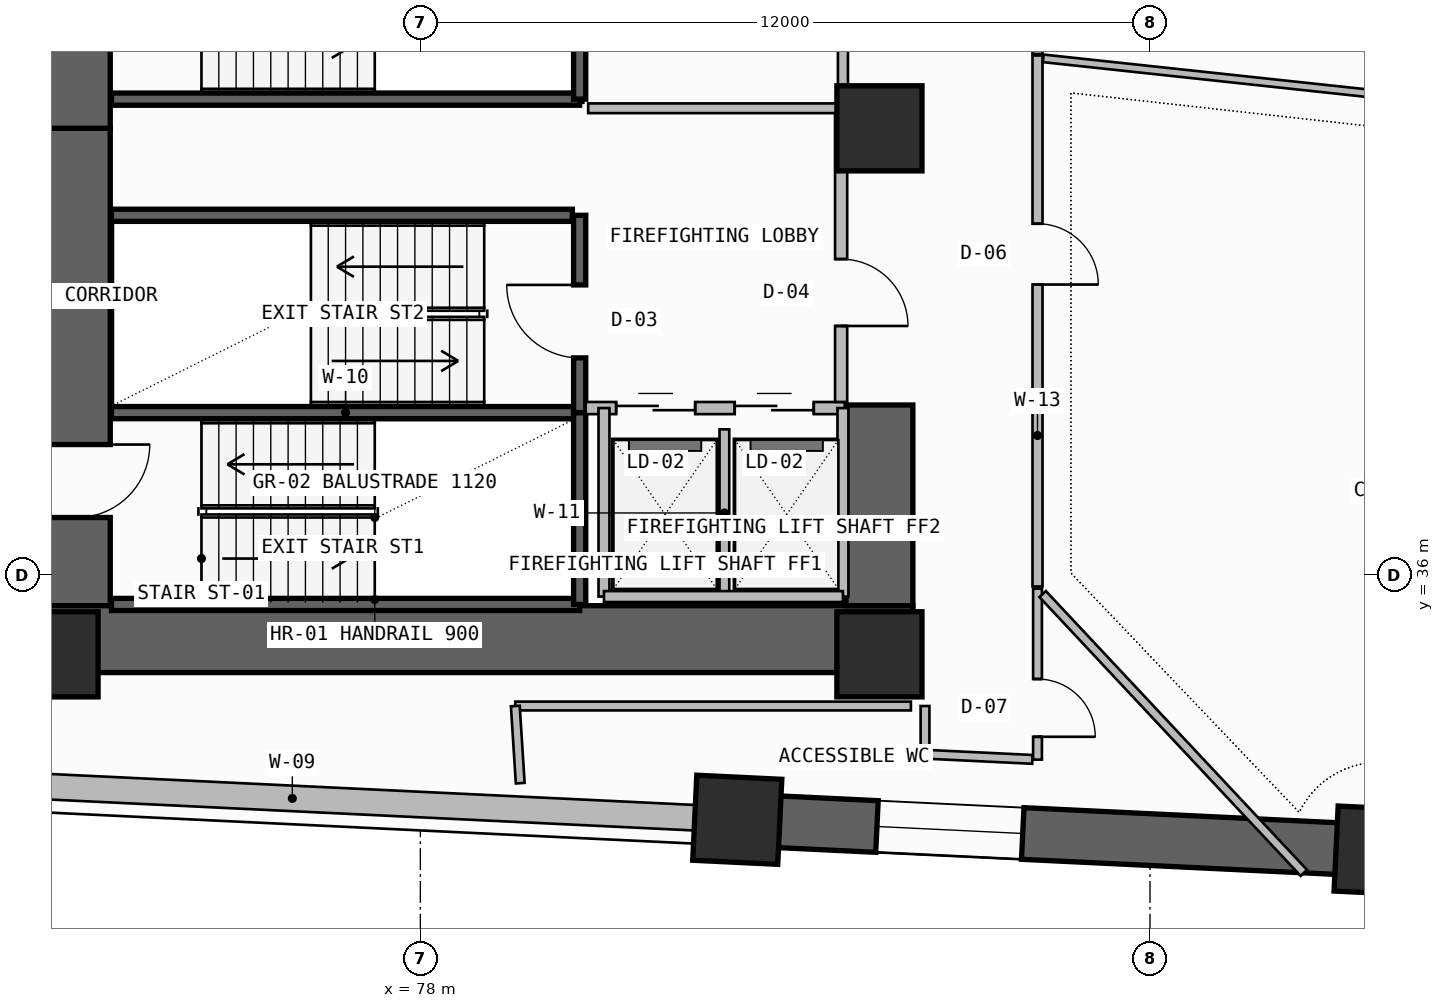
"""IFC4 building model, lengths in metres.
Left out: names, types, materials, properties, quantities, classifications, styles, units other than length and angle.
Written with IfcOpenShell. Run it as: python <this file> out.ifc"""

import sys

from ifc_helpers import new_model, si_unit, direction, frame, frame_2d, origin, origin_2d, place, context, subcontext, project, spatial, rectangle, extrude, element, fill, save


model = new_model("IFC4")
c1 = context("Model", 3, precision=1e-05, world=origin(), true_north=direction((0.0, 1.0)))
c2 = subcontext(c1, "Body", "Model", "MODEL_VIEW")
j1 = project(units=[si_unit("LENGTHUNIT", "METRE"), si_unit("PLANEANGLEUNIT", "RADIAN")], contexts=[c1])
p1 = place(None, origin())
s1 = spatial("IfcSite", under=j1, at=p1, CompositionType="ELEMENT")
p2 = place(p1, origin())
s2 = spatial("IfcBuilding", under=s1, at=p2, CompositionType="ELEMENT")
p3 = place(p2, frame((0.0, 0.0, 48.3)))
s3 = spatial("IfcBuildingStorey", under=s2, at=p3, CompositionType="ELEMENT", Elevation=48.3)
p4 = place(p3, frame((72.35, 35.5, -0.26), z_axis=(0.0, 0.0, 1.0), x_axis=(0.0, 1.0, 0.0)))
e1 = element("IfcWall", 1, at=p4, inside=s3, PredefinedType="SHEAR", context=c2, shape_type="SweptSolid", body=[
    extrude(rectangle(XDim=7.85, YDim=1.1, at=frame_2d((3.925, 0.0))), origin(), (0.0, 0.0, 1.0), 3.66),
])
p5 = place(p4, frame((1.45, 0.0, 0.26)))
e2 = element("IfcOpeningElement", 2, at=p5, cuts=e1, PredefinedType="OPENING", context=c2, shape_type="SweptSolid", body=[
    extrude(rectangle(XDim=1.2, YDim=2.2, at=frame_2d((0.6, 1.1))), frame((0.0, 0.56, 0.0), z_axis=(0.0, -1.0, 0.0), x_axis=(1.0, 0.0, 0.0)), (0.0, 0.0, 1.0), 1.12),
])
p6 = place(p3, frame((71.8, 34.95, -0.26), z_axis=(0.0, 0.0, 1.0), x_axis=(1.0, 0.0, 0.0)))
e3 = element("IfcWall", 3, at=p6, inside=s3, PredefinedType="SHEAR", context=c2, shape_type="SweptSolid", body=[
    extrude(rectangle(XDim=14.3, YDim=1.1, at=frame_2d((7.15, 0.0))), origin(), (0.0, 0.0, 1.0), 3.66),
])
p7 = place(p3, frame((85.55, 35.5, -0.26), z_axis=(0.0, 0.0, 1.0), x_axis=(0.0, 1.0, 0.0)))
e4 = element("IfcWall", 4, at=p7, inside=s3, PredefinedType="SHEAR", context=c2, shape_type="SweptSolid", body=[
    extrude(rectangle(XDim=3.3, YDim=1.1, at=frame_2d((1.65, 0.0))), origin(), (0.0, 0.0, 1.0), 3.66),
])
p8 = place(p3, frame((72.35, 43.35, -0.26), z_axis=(0.0, 0.0, 1.0), x_axis=(0.0, 1.0, 0.0)))
e5 = element("IfcWall", 5, at=p8, inside=s3, PredefinedType="SHEAR", context=c2, shape_type="SweptSolid", body=[
    extrude(rectangle(XDim=12.7, YDim=1.1, at=frame_2d((6.35, 0.0))), origin(), (0.0, 0.0, 1.0), 3.66),
])
p9 = place(p8, frame((1.35, 0.0, 0.26)))
e6 = element("IfcOpeningElement", 6, at=p9, cuts=e5, PredefinedType="OPENING", context=c2, shape_type="SweptSolid", body=[
    extrude(rectangle(XDim=1.2, YDim=2.2, at=frame_2d((0.6, 1.1))), frame((0.0, 0.56, 0.0), z_axis=(0.0, -1.0, 0.0), x_axis=(1.0, 0.0, 0.0)), (0.0, 0.0, 1.0), 1.12),
])
for number, where, z_axis, x_axis in (
    (7, (72.0, 34.7, 0.0), (0.0, 0.0, 1.0), (1.0, 0.0, 0.0)),
    (8, (85.55, 34.7, 0.0), (0.0, 0.0, 1.0), (1.0, 0.0, 0.0)),
    (9, (85.55, 43.35, 0.0), (0.0, 0.0, 1.0), (1.0, 0.0, 0.0)),
    (10, (83.212, 31.979, 0.0), (0.0, 0.0, 1.0), (-0.999, 0.048, 0.0)),
    (11, (93.76, 31.472, 0.0), (0.0, 0.0, 1.0), (-0.999, 0.048, 0.0)),
):
    element("IfcColumn", number, at=place(p3, frame(where, z_axis=z_axis, x_axis=x_axis)), inside=s3, PredefinedType="COLUMN", context=c2, shape_type="SweptSolid", body=[
        extrude(rectangle(XDim=1.4, YDim=1.4, at=origin_2d()), origin(), (0.0, 0.0, 1.0), 3.6),
    ])
p10 = place(p3, frame((65.281, 32.841, 0.0), z_axis=(0.0, 0.0, 1.0), x_axis=(0.998848298084, -0.047979968897, 0.0)))
e12 = element("IfcWall", 12, at=p10, inside=s3, PredefinedType="SOLIDWALL", context=c2, shape_type="SweptSolid", body=[
    extrude(rectangle(XDim=17.952, YDim=0.42, at=frame_2d((8.976, 0.0))), origin(), (0.0, 0.0, 1.0), 2.385),
])
p11 = place(p10, frame((0.9, 0.0, 1.2)))
e13 = element("IfcOpeningElement", 13, at=p11, cuts=e12, PredefinedType="OPENING", context=c2, shape_type="SweptSolid", body=[
    extrude(rectangle(XDim=2.4, YDim=0.9, at=frame_2d((1.2, 0.45))), frame((0.0, 0.22, 0.0), z_axis=(0.0, -1.0, 0.0), x_axis=(1.0, 0.0, 0.0)), (0.0, 0.0, 1.0), 0.44),
])
p12 = place(p3, frame((83.212, 31.979, -0.26), z_axis=(0.0, 0.0, 1.0), x_axis=(0.998848235141, -0.047981279227, 0.0)))
e14 = element("IfcWall", 14, at=p12, inside=s3, PredefinedType="SHEAR", context=c2, shape_type="SweptSolid", body=[
    extrude(rectangle(XDim=27.456, YDim=0.85, at=frame_2d((13.728, 0.0))), origin(), (0.0, 0.0, 1.0), 3.66),
])
p13 = place(p12, frame((2.3, 0.0, 1.2)))
e15 = element("IfcOpeningElement", 15, at=p13, cuts=e14, PredefinedType="OPENING", context=c2, shape_type="SweptSolid", body=[
    extrude(rectangle(XDim=2.4, YDim=0.9, at=frame_2d((1.2, 0.45))), frame((0.0, 0.435, 0.0), z_axis=(0.0, -1.0, 0.0), x_axis=(1.0, 0.0, 0.0)), (0.0, 0.0, 1.0), 0.87),
])
for number, where, z_axis, x_axis in (
    (16, (72.92, 35.52, -0.26), (0.0, 0.0, 1.0), (1.0, 0.0, 0.0)),
    (17, (72.92, 38.675, -0.26), (0.0, 0.0, 1.0), (1.0, 0.0, 0.0)),
):
    element("IfcWall", number, at=place(p3, frame(where, z_axis=z_axis, x_axis=x_axis)), inside=s3, PredefinedType="SOLIDWALL", context=c2, shape_type="SweptSolid", body=[
        extrude(rectangle(XDim=7.7, YDim=0.2, at=frame_2d((3.85, 0.0))), origin(), (0.0, 0.0, 1.0), 3.66),
    ])
p14 = place(p3, frame((80.62, 35.52, -0.26), z_axis=(0.0, 0.0, 1.0), x_axis=(0.0, 1.0, 0.0)))
e18 = element("IfcWall", 18, at=p14, inside=s3, PredefinedType="SOLIDWALL", context=c2, shape_type="SweptSolid", body=[
    extrude(rectangle(XDim=3.155, YDim=0.2, at=frame_2d((1.578, 0.0))), origin(), (0.0, 0.0, 1.0), 3.66),
])
p15 = place(p3, frame((80.62, 38.675, -0.26), z_axis=(0.0, 0.0, 1.0), x_axis=(0.0, 1.0, 0.0)))
e19 = element("IfcWall", 19, at=p15, inside=s3, PredefinedType="SOLIDWALL", context=c2, shape_type="SweptSolid", body=[
    extrude(rectangle(XDim=3.245, YDim=0.2, at=frame_2d((1.623, 0.0))), origin(), (0.0, 0.0, 1.0), 3.66),
])
p16 = place(p15, frame((0.9, 0.0, 0.26)))
e20 = element("IfcOpeningElement", 20, at=p16, cuts=e19, PredefinedType="OPENING", context=c2, shape_type="SweptSolid", body=[
    extrude(rectangle(XDim=1.2, YDim=2.2, at=frame_2d((0.6, 1.1))), frame((0.0, 0.11, 0.0), z_axis=(0.0, -1.0, 0.0), x_axis=(1.0, 0.0, 0.0)), (0.0, 0.0, 1.0), 0.22),
])
p17 = place(p3, frame((80.72, 38.75, 0.0), z_axis=(0.0, 0.0, 1.0), x_axis=(1.0, 0.0, 0.0)))
e21 = element("IfcWall", 21, at=p17, inside=s3, PredefinedType="SOLIDWALL", context=c2, shape_type="SweptSolid", body=[
    extrude(rectangle(XDim=4.26, YDim=0.2, at=frame_2d((2.13, 0.0))), origin(), (0.0, 0.0, 1.0), 3.4),
])
p18 = place(p17, frame((0.5, 0.0, 0.0)))
e22 = element("IfcOpeningElement", 22, at=p18, cuts=e21, PredefinedType="OPENING", context=c2, shape_type="SweptSolid", body=[
    extrude(rectangle(XDim=1.3, YDim=2.3, at=frame_2d((0.65, 1.15))), frame((0.0, 0.11, 0.0), z_axis=(0.0, -1.0, 0.0), x_axis=(1.0, 0.0, 0.0)), (0.0, 0.0, 1.0), 0.22),
])
p19 = place(p17, frame((2.45, 0.0, 0.0)))
e23 = element("IfcOpeningElement", 23, at=p19, cuts=e21, PredefinedType="OPENING", context=c2, shape_type="SweptSolid", body=[
    extrude(rectangle(XDim=1.3, YDim=2.3, at=frame_2d((0.65, 1.15))), frame((0.0, 0.11, 0.0), z_axis=(0.0, -1.0, 0.0), x_axis=(1.0, 0.0, 0.0)), (0.0, 0.0, 1.0), 0.22),
])
p20 = place(p3, frame((83.0, 35.65, 0.0), z_axis=(0.0, 0.0, 1.0), x_axis=(0.0, 1.0, 0.0)))
e24 = element("IfcWall", 24, at=p20, inside=s3, PredefinedType="PLUMBINGWALL", context=c2, shape_type="SweptSolid", body=[
    extrude(rectangle(XDim=2.75, YDim=0.16, at=frame_2d((1.375, 0.0))), origin(), (0.0, 0.0, 1.0), 3.4),
])
for number, where, z_axis, x_axis in (
    (25, (84.95, 35.65, 0.0), (0.0, 0.0, 1.0), (0.0, 1.0, 0.0)),
    (26, (81.02, 35.65, 0.0), (0.0, 0.0, 1.0), (0.0, 1.0, 0.0)),
):
    element("IfcWall", number, at=place(p3, frame(where, z_axis=z_axis, x_axis=x_axis)), inside=s3, PredefinedType="SOLIDWALL", context=c2, shape_type="SweptSolid", body=[
        extrude(rectangle(XDim=3.1, YDim=0.18, at=frame_2d((1.55, 0.0))), origin(), (0.0, 0.0, 1.0), 3.4),
    ])
p21 = place(p3, frame((81.02, 35.65, 0.0), z_axis=(0.0, 0.0, 1.0), x_axis=(1.0, 0.0, 0.0)))
e27 = element("IfcWall", 27, at=p21, inside=s3, PredefinedType="SOLIDWALL", context=c2, shape_type="SweptSolid", body=[
    extrude(rectangle(XDim=3.93, YDim=0.18, at=frame_2d((1.965, 0.0))), origin(), (0.0, 0.0, 1.0), 3.4),
])
p22 = place(p3, frame((84.92, 38.85, 0.0), z_axis=(0.0, 0.0, 1.0), x_axis=(0.0, 1.0, 0.0)))
e28 = element("IfcWall", 28, at=p22, inside=s3, PredefinedType="SOLIDWALL", context=c2, shape_type="SweptSolid", body=[
    extrude(rectangle(XDim=4.83, YDim=0.2, at=frame_2d((2.415, 0.0))), origin(), (0.0, 0.0, 1.0), 3.4),
])
p23 = place(p22, frame((1.25, 0.0, 0.0)))
e29 = element("IfcOpeningElement", 29, at=p23, cuts=e28, PredefinedType="OPENING", context=c2, shape_type="SweptSolid", body=[
    extrude(rectangle(XDim=1.1, YDim=2.2, at=frame_2d((0.55, 1.1))), frame((0.0, 0.11, 0.0), z_axis=(0.0, -1.0, 0.0), x_axis=(1.0, 0.0, 0.0)), (0.0, 0.0, 1.0), 0.22),
])
p24 = place(p3, frame((72.92, 41.92, -0.26), z_axis=(0.0, 0.0, 1.0), x_axis=(1.0, 0.0, 0.0)))
e30 = element("IfcWall", 30, at=p24, inside=s3, PredefinedType="SOLIDWALL", context=c2, shape_type="SweptSolid", body=[
    extrude(rectangle(XDim=7.58, YDim=0.2, at=frame_2d((3.79, 0.0))), origin(), (0.0, 0.0, 1.0), 3.66),
])
p25 = place(p3, frame((72.92, 43.83, -0.26), z_axis=(0.0, 0.0, 1.0), x_axis=(1.0, 0.0, 0.0)))
e31 = element("IfcWall", 31, at=p25, inside=s3, PredefinedType="SOLIDWALL", context=c2, shape_type="SweptSolid", body=[
    extrude(rectangle(XDim=7.7, YDim=0.2, at=frame_2d((3.85, 0.0))), origin(), (0.0, 0.0, 1.0), 3.66),
])
p26 = place(p3, frame((80.62, 43.83, -0.26), z_axis=(0.0, 0.0, 1.0), x_axis=(0.0, 1.0, 0.0)))
e32 = element("IfcWall", 32, at=p26, inside=s3, PredefinedType="SOLIDWALL", context=c2, shape_type="SweptSolid", body=[
    extrude(rectangle(XDim=3.24, YDim=0.2, at=frame_2d((1.62, 0.0))), origin(), (0.0, 0.0, 1.0), 3.66),
])
p27 = place(p3, frame((84.95, 43.68, 0.0), z_axis=(0.0, 0.0, 1.0), x_axis=(0.0, 1.0, 0.0)))
e33 = element("IfcWall", 33, at=p27, inside=s3, PredefinedType="PLUMBINGWALL", context=c2, shape_type="SweptSolid", body=[
    extrude(rectangle(XDim=1.9, YDim=0.165, at=frame_2d((0.95, 0.0))), origin(), (0.0, 0.0, 1.0), 3.4),
])
p28 = place(p3, frame((80.76, 43.68, 0.0), z_axis=(0.0, 0.0, 1.0), x_axis=(1.0, 0.0, 0.0)))
e34 = element("IfcWall", 34, at=p28, inside=s3, PredefinedType="PLUMBINGWALL", context=c2, shape_type="SweptSolid", body=[
    extrude(rectangle(XDim=4.19, YDim=0.16, at=frame_2d((2.095, 0.0))), origin(), (0.0, 0.0, 1.0), 3.4),
])
p29 = place(p3, frame((88.15, 32.969, 0.0), z_axis=(0.0, 0.0, 1.0), x_axis=(0.0, 1.0, 0.0)))
e35 = element("IfcWall", 35, at=p29, inside=s3, PredefinedType="PARTITIONING", context=c2, shape_type="SweptSolid", body=[
    extrude(rectangle(XDim=2.813, YDim=0.145, at=frame_2d((1.406, 0.0))), origin(), (0.0, 0.0, 1.0), 2.785),
])
p30 = place(p29, frame((0.375, 0.0, 0.0)))
e36 = element("IfcOpeningElement", 36, at=p30, cuts=e35, PredefinedType="OPENING", context=c2, shape_type="SweptSolid", body=[
    extrude(rectangle(XDim=0.95, YDim=2.15, at=frame_2d((0.475, 1.075))), frame((0.0, 0.083, 0.0), z_axis=(0.0, -1.0, 0.0), x_axis=(1.0, 0.0, 0.0)), (0.0, 0.0, 1.0), 0.165),
])
p31 = place(p3, frame((86.3, 33.057, 0.0), z_axis=(0.0, 0.0, 1.0), x_axis=(0.998843945898, -0.048070487232, 0.0)))
e37 = element("IfcWall", 37, at=p31, inside=s3, PredefinedType="PARTITIONING", context=c2, shape_type="SweptSolid", body=[
    extrude(rectangle(XDim=1.767, YDim=0.145, at=frame_2d((0.884, 0.0))), origin(), (0.0, 0.0, 1.0), 3.4),
])
p32 = place(p3, frame((86.3, 33.85, 0.0), z_axis=(0.0, 0.0, 1.0), x_axis=(0.0, -1.0, 0.0)))
e38 = element("IfcWall", 38, at=p32, inside=s3, PredefinedType="PARTITIONING", context=c2, shape_type="SweptSolid", body=[
    extrude(rectangle(XDim=0.793, YDim=0.145, at=frame_2d((0.396, 0.0))), origin(), (0.0, 0.0, 1.0), 2.935),
])
p33 = place(p3, frame((88.235, 35.691, 0.0), z_axis=(0.0, 0.0, 1.0), x_axis=(0.683667039651, -0.729794066086, 0.0)))
e39 = element("IfcWall", 39, at=p33, inside=s3, PredefinedType="PARTITIONING", context=c2, shape_type="SweptSolid", body=[
    extrude(rectangle(XDim=6.282, YDim=0.145, at=frame_2d((3.141, 0.0))), origin(), (0.0, 0.0, 1.0), 2.385),
])
p34 = place(p3, frame((88.15, 35.816, 0.0), z_axis=(0.0, 0.0, 1.0), x_axis=(0.0, 1.0, 0.0)))
e40 = element("IfcWall", 40, at=p34, inside=s3, PredefinedType="PARTITIONING", context=c2, shape_type="SweptSolid", body=[
    extrude(rectangle(XDim=8.731, YDim=0.165, at=frame_2d((4.366, 0.0))), origin(), (0.0, 0.0, 1.0), 2.785),
])
p35 = place(p34, frame((4.965, 0.0, 0.0)))
e41 = element("IfcOpeningElement", 41, at=p35, cuts=e40, PredefinedType="OPENING", context=c2, shape_type="SweptSolid", body=[
    extrude(rectangle(XDim=1.0, YDim=2.2, at=frame_2d((0.5, 1.1))), frame((0.0, 0.093, 0.0), z_axis=(0.0, -1.0, 0.0), x_axis=(1.0, 0.0, 0.0)), (0.0, 0.0, 1.0), 0.185),
])
p36 = place(p3, frame((88.244, 44.501, 0.0), z_axis=(0.0, 0.0, 1.0), x_axis=(0.994268709567, -0.106909930207, 0.0)))
e42 = element("IfcWall", 42, at=p36, inside=s3, PredefinedType="PARTITIONING", context=c2, shape_type="SweptSolid", body=[
    extrude(rectangle(XDim=23.037, YDim=0.125, at=frame_2d((11.519, 0.0))), origin(), (0.0, 0.0, 1.0), 2.785),
])
p37 = place(p3, frame((88.15, 44.572, 0.0), z_axis=(0.0, 0.0, 1.0), x_axis=(0.0, 1.0, 0.0)))
e43 = element("IfcWall", 43, at=p37, inside=s3, PredefinedType="PARTITIONING", context=c2, shape_type="SweptSolid", body=[
    extrude(rectangle(XDim=7.238, YDim=0.165, at=frame_2d((3.619, 0.0))), origin(), (0.0, 0.0, 1.0), 2.785),
])
p38 = place(p37, frame((2.819, 0.0, 0.0)))
e44 = element("IfcOpeningElement", 44, at=p38, cuts=e43, PredefinedType="OPENING", context=c2, shape_type="SweptSolid", body=[
    extrude(rectangle(XDim=1.6, YDim=2.3, at=frame_2d((0.8, 1.15))), frame((0.0, 0.093, 0.0), z_axis=(0.0, -1.0, 0.0), x_axis=(1.0, 0.0, 0.0)), (0.0, 0.0, 1.0), 0.185),
])
p39 = place(p3, frame((79.562, 33.85, 0.0), z_axis=(0.0, 0.0, 1.0), x_axis=(1.0, 0.0, 0.0)))
e45 = element("IfcWall", 45, at=p39, inside=s3, PredefinedType="PARTITIONING", context=c2, shape_type="SweptSolid", body=[
    extrude(rectangle(XDim=6.506, YDim=0.145, at=frame_2d((3.253, 0.0))), origin(), (0.0, 0.0, 1.0), 2.785),
])
p40 = place(p3, frame((79.643, 32.581, 0.0), z_axis=(0.0, 0.0, 1.0), x_axis=(-0.06375305254, 0.997965704968, 0.0)))
e46 = element("IfcWall", 46, at=p40, inside=s3, PredefinedType="PARTITIONING", context=c2, shape_type="SweptSolid", body=[
    extrude(rectangle(XDim=1.271, YDim=0.145, at=frame_2d((0.636, 0.0))), origin(), (0.0, 0.0, 1.0), 3.4),
])
p41 = place(p13, origin())
e47 = element("IfcWindow", 47, at=p41, inside=s3, PartitioningType="SINGLE_PANEL", PredefinedType="WINDOW", context=c2, shape_type="SweptSolid", body=[
    extrude(rectangle(XDim=2.4, YDim=0.9, at=frame_2d((1.2, 0.45))), frame((0.0, 0.03, 0.0), z_axis=(0.0, -1.0, 0.0), x_axis=(1.0, 0.0, 0.0)), (0.0, 0.0, 1.0), 0.06),
])
fill(e15, e47)
p42 = place(p5, frame((1.2, 0.0, 0.0), z_axis=(0.0, 0.0, 1.0), x_axis=(-1.0, 0.0, 0.0)))
e48 = element("IfcDoor", 48, at=p42, inside=s3, OperationType="SINGLE_SWING_LEFT", PredefinedType="USERDEFINED", context=c2, shape_type="SweptSolid", body=[
    extrude(rectangle(XDim=1.2, YDim=2.2, at=frame_2d((0.6, 1.1))), frame((0.0, 0.025, 0.0), z_axis=(0.0, -1.0, 0.0), x_axis=(1.0, 0.0, 0.0)), (0.0, 0.0, 1.0), 0.05),
])
fill(e2, e48)
p43 = place(p16, origin())
e49 = element("IfcDoor", 49, at=p43, inside=s3, OperationType="SINGLE_SWING_RIGHT", PredefinedType="USERDEFINED", context=c2, shape_type="SweptSolid", body=[
    extrude(rectangle(XDim=1.2, YDim=2.2, at=frame_2d((0.6, 1.1))), frame((0.0, 0.025, 0.0), z_axis=(0.0, -1.0, 0.0), x_axis=(1.0, 0.0, 0.0)), (0.0, 0.0, 1.0), 0.05),
])
fill(e20, e49)
p44 = place(p18, origin())
e50 = element("IfcDoor", 50, at=p44, inside=s3, OperationType="DOUBLE_DOOR_SLIDING", PredefinedType="DOOR", context=c2, shape_type="SweptSolid", body=[
    extrude(rectangle(XDim=1.3, YDim=2.3, at=frame_2d((0.65, 1.15))), frame((0.0, 0.025, 0.0), z_axis=(0.0, -1.0, 0.0), x_axis=(1.0, 0.0, 0.0)), (0.0, 0.0, 1.0), 0.05),
])
fill(e22, e50)
p45 = place(p19, origin())
e51 = element("IfcDoor", 51, at=p45, inside=s3, OperationType="DOUBLE_DOOR_SLIDING", PredefinedType="DOOR", context=c2, shape_type="SweptSolid", body=[
    extrude(rectangle(XDim=1.3, YDim=2.3, at=frame_2d((0.65, 1.15))), frame((0.0, 0.025, 0.0), z_axis=(0.0, -1.0, 0.0), x_axis=(1.0, 0.0, 0.0)), (0.0, 0.0, 1.0), 0.05),
])
fill(e23, e51)
p46 = place(p23, frame((1.1, 0.0, 0.0), z_axis=(0.0, 0.0, 1.0), x_axis=(-1.0, 0.0, 0.0)))
e52 = element("IfcDoor", 52, at=p46, inside=s3, OperationType="SINGLE_SWING_RIGHT", PredefinedType="DOOR", context=c2, shape_type="SweptSolid", body=[
    extrude(rectangle(XDim=1.1, YDim=2.2, at=frame_2d((0.55, 1.1))), frame((0.0, 0.025, 0.0), z_axis=(0.0, -1.0, 0.0), x_axis=(1.0, 0.0, 0.0)), (0.0, 0.0, 1.0), 0.05),
])
fill(e29, e52)
p47 = place(p30, frame((0.95, 0.0, 0.0), z_axis=(0.0, 0.0, 1.0), x_axis=(-1.0, 0.0, 0.0)))
e53 = element("IfcDoor", 53, at=p47, inside=s3, OperationType="SINGLE_SWING_RIGHT", PredefinedType="DOOR", context=c2, shape_type="SweptSolid", body=[
    extrude(rectangle(XDim=0.95, YDim=2.15, at=frame_2d((0.475, 1.075))), frame((0.0, 0.025, 0.0), z_axis=(0.0, -1.0, 0.0), x_axis=(1.0, 0.0, 0.0)), (0.0, 0.0, 1.0), 0.05),
])
fill(e36, e53)
p48 = place(p35, frame((1.0, 0.0, 0.0), z_axis=(0.0, 0.0, 1.0), x_axis=(-1.0, 0.0, 0.0)))
e54 = element("IfcDoor", 54, at=p48, inside=s3, OperationType="SINGLE_SWING_RIGHT", PredefinedType="DOOR", context=c2, shape_type="SweptSolid", body=[
    extrude(rectangle(XDim=1.0, YDim=2.2, at=frame_2d((0.5, 1.1))), frame((0.0, 0.025, 0.0), z_axis=(0.0, -1.0, 0.0), x_axis=(1.0, 0.0, 0.0)), (0.0, 0.0, 1.0), 0.05),
])
fill(e41, e54)
save(model, sys.argv[1])
